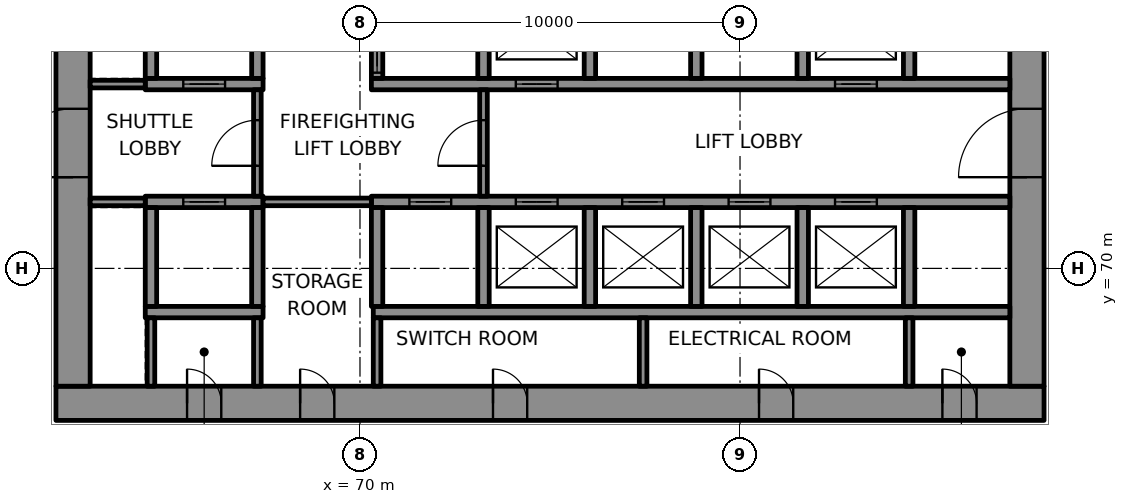
"""IFC4 building model, lengths in metres.
Left out: names, types, materials, properties, quantities, classifications, styles, units other than length and angle.
Written with IfcOpenShell. Run it as: python <this file> out.ifc"""

import sys

from ifc_helpers import new_model, si_unit, direction, frame, frame_2d, origin, place, context, subcontext, project, spatial, rectangle, extrude, element, fill, save


model = new_model("IFC4")
c1 = context("Model", 3, precision=1e-05, world=origin(), true_north=direction((0.0, 1.0)))
c2 = subcontext(c1, "Body", "Model", "MODEL_VIEW")
j1 = project(units=[si_unit("LENGTHUNIT", "METRE"), si_unit("PLANEANGLEUNIT", "RADIAN")], contexts=[c1])
p1 = place(None, origin())
s1 = spatial("IfcSite", under=j1, at=p1, CompositionType="ELEMENT")
p2 = place(p1, origin())
s2 = spatial("IfcBuilding", under=s1, at=p2, CompositionType="ELEMENT")
p3 = place(p2, frame((0.0, 0.0, 140.8)))
s3 = spatial("IfcBuildingStorey", under=s2, at=p3, CompositionType="ELEMENT", Elevation=140.8)
p4 = place(p3, frame((62.0, 66.45, 0.0), z_axis=(0.0, 0.0, 1.0), x_axis=(1.0, 0.0, 0.0)))
e1 = element("IfcWall", 1, at=p4, inside=s3, PredefinedType="SHEAR", context=c2, shape_type="SweptSolid", body=[
    extrude(rectangle(XDim=26.0, YDim=0.9, at=frame_2d((13.0, 0.0))), origin(), (0.0, 0.0, 1.0), 5.55),
])
p5 = place(p4, frame((3.45, 0.0, 0.0)))
e2 = element("IfcOpeningElement", 2, at=p5, cuts=e1, PredefinedType="OPENING", context=c2, shape_type="SweptSolid", body=[
    extrude(rectangle(XDim=0.9, YDim=2.1, at=frame_2d((0.45, 1.05))), frame((0.0, 0.46, 0.0), z_axis=(0.0, -1.0, 0.0), x_axis=(1.0, 0.0, 0.0)), (0.0, 0.0, 1.0), 0.92),
])
p6 = place(p4, frame((6.425, 0.0, 0.0)))
e3 = element("IfcOpeningElement", 3, at=p6, cuts=e1, PredefinedType="OPENING", context=c2, shape_type="SweptSolid", body=[
    extrude(rectangle(XDim=0.9, YDim=2.1, at=frame_2d((0.45, 1.05))), frame((0.0, 0.46, 0.0), z_axis=(0.0, -1.0, 0.0), x_axis=(1.0, 0.0, 0.0)), (0.0, 0.0, 1.0), 0.92),
])
p7 = place(p4, frame((11.5, 0.0, 0.0)))
e4 = element("IfcOpeningElement", 4, at=p7, cuts=e1, PredefinedType="OPENING", context=c2, shape_type="SweptSolid", body=[
    extrude(rectangle(XDim=0.9, YDim=2.1, at=frame_2d((0.45, 1.05))), frame((0.0, 0.46, 0.0), z_axis=(0.0, -1.0, 0.0), x_axis=(1.0, 0.0, 0.0)), (0.0, 0.0, 1.0), 0.92),
])
p8 = place(p4, frame((18.5, 0.0, 0.0)))
e5 = element("IfcOpeningElement", 5, at=p8, cuts=e1, PredefinedType="OPENING", context=c2, shape_type="SweptSolid", body=[
    extrude(rectangle(XDim=0.9, YDim=2.1, at=frame_2d((0.45, 1.05))), frame((0.0, 0.46, 0.0), z_axis=(0.0, -1.0, 0.0), x_axis=(1.0, 0.0, 0.0)), (0.0, 0.0, 1.0), 0.92),
])
p9 = place(p4, frame((23.325, 0.0, 0.0)))
e6 = element("IfcOpeningElement", 6, at=p9, cuts=e1, PredefinedType="OPENING", context=c2, shape_type="SweptSolid", body=[
    extrude(rectangle(XDim=0.9, YDim=2.1, at=frame_2d((0.45, 1.05))), frame((0.0, 0.46, 0.0), z_axis=(0.0, -1.0, 0.0), x_axis=(1.0, 0.0, 0.0)), (0.0, 0.0, 1.0), 0.92),
])
p10 = place(p3, frame((62.45, 66.9, 0.0), z_axis=(0.0, 0.0, 1.0), x_axis=(0.0, 1.0, 0.0)))
e7 = element("IfcWall", 7, at=p10, inside=s3, PredefinedType="SHEAR", context=c2, shape_type="SweptSolid", body=[
    extrude(rectangle(XDim=16.2, YDim=0.9, at=frame_2d((8.1, 0.0))), origin(), (0.0, 0.0, 1.0), 5.55),
])
p11 = place(p10, frame((5.5, 0.0, 0.0)))
e8 = element("IfcOpeningElement", 8, at=p11, cuts=e7, PredefinedType="OPENING", context=c2, shape_type="SweptSolid", body=[
    extrude(rectangle(XDim=1.8, YDim=2.1, at=frame_2d((0.9, 1.05))), frame((0.0, 0.46, 0.0), z_axis=(0.0, -1.0, 0.0), x_axis=(1.0, 0.0, 0.0)), (0.0, 0.0, 1.0), 0.92),
])
p12 = place(p3, frame((87.55, 66.9, 0.0), z_axis=(0.0, 0.0, 1.0), x_axis=(0.0, 1.0, 0.0)))
e9 = element("IfcWall", 9, at=p12, inside=s3, PredefinedType="SHEAR", context=c2, shape_type="SweptSolid", body=[
    extrude(rectangle(XDim=16.2, YDim=0.9, at=frame_2d((8.1, 0.0))), origin(), (0.0, 0.0, 1.0), 5.55),
])
p13 = place(p12, frame((5.5, 0.0, 0.0)))
e10 = element("IfcOpeningElement", 10, at=p13, cuts=e9, PredefinedType="OPENING", context=c2, shape_type="SweptSolid", body=[
    extrude(rectangle(XDim=1.8, YDim=2.1, at=frame_2d((0.9, 1.05))), frame((0.0, 0.46, 0.0), z_axis=(0.0, -1.0, 0.0), x_axis=(1.0, 0.0, 0.0)), (0.0, 0.0, 1.0), 0.92),
])
p14 = place(p12, frame((12.272, 0.0, 0.0)))
e11 = element("IfcOpeningElement", 11, at=p14, cuts=e9, PredefinedType="OPENING", context=c2, shape_type="SweptSolid", body=[
    extrude(rectangle(XDim=0.9, YDim=2.1, at=frame_2d((0.45, 1.05))), frame((0.0, 0.46, 0.0), z_axis=(0.0, -1.0, 0.0), x_axis=(1.0, 0.0, 0.0)), (0.0, 0.0, 1.0), 0.92),
])
p15 = place(p3, frame((64.35, 68.85, 0.0), z_axis=(0.0, 0.0, 1.0), x_axis=(1.0, 0.0, 0.0)))
e12 = element("IfcWall", 12, at=p15, inside=s3, PredefinedType="SHEAR", context=c2, shape_type="SweptSolid", body=[
    extrude(rectangle(XDim=3.1, YDim=0.3, at=frame_2d((1.55, 0.0))), origin(), (0.0, 0.0, 1.0), 5.55),
])
p16 = place(p3, frame((70.35, 68.85, 0.0), z_axis=(0.0, 0.0, 1.0), x_axis=(1.0, 0.0, 0.0)))
e13 = element("IfcWall", 13, at=p16, inside=s3, PredefinedType="SHEAR", context=c2, shape_type="SweptSolid", body=[
    extrude(rectangle(XDim=16.75, YDim=0.3, at=frame_2d((8.375, 0.0))), origin(), (0.0, 0.0, 1.0), 5.55),
])
p17 = place(p3, frame((64.35, 71.75, 0.0), z_axis=(0.0, 0.0, 1.0), x_axis=(1.0, 0.0, 0.0)))
e14 = element("IfcWall", 14, at=p17, inside=s3, PredefinedType="SHEAR", context=c2, shape_type="SweptSolid", body=[
    extrude(rectangle(XDim=3.1, YDim=0.3, at=frame_2d((1.55, 0.0))), origin(), (0.0, 0.0, 1.0), 5.55),
])
p18 = place(p17, frame((1.0, 0.0, 0.0)))
e15 = element("IfcOpeningElement", 15, at=p18, cuts=e14, PredefinedType="OPENING", context=c2, shape_type="SweptSolid", body=[
    extrude(rectangle(XDim=1.1, YDim=2.1, at=frame_2d((0.55, 1.05))), frame((0.0, 0.16, 0.0), z_axis=(0.0, -1.0, 0.0), x_axis=(1.0, 0.0, 0.0)), (0.0, 0.0, 1.0), 0.32),
])
p19 = place(p3, frame((70.3, 71.75, 0.0), z_axis=(0.0, 0.0, 1.0), x_axis=(1.0, 0.0, 0.0)))
e16 = element("IfcWall", 16, at=p19, inside=s3, PredefinedType="SHEAR", context=c2, shape_type="SweptSolid", body=[
    extrude(rectangle(XDim=16.8, YDim=0.3, at=frame_2d((8.4, 0.0))), origin(), (0.0, 0.0, 1.0), 5.55),
])
p20 = place(p19, frame((1.0, 0.0, 0.0)))
e17 = element("IfcOpeningElement", 17, at=p20, cuts=e16, PredefinedType="OPENING", context=c2, shape_type="SweptSolid", body=[
    extrude(rectangle(XDim=1.1, YDim=2.1, at=frame_2d((0.55, 1.05))), frame((0.0, 0.16, 0.0), z_axis=(0.0, -1.0, 0.0), x_axis=(1.0, 0.0, 0.0)), (0.0, 0.0, 1.0), 0.32),
])
p21 = place(p19, frame((3.8, 0.0, 0.0)))
e18 = element("IfcOpeningElement", 18, at=p21, cuts=e16, PredefinedType="OPENING", context=c2, shape_type="SweptSolid", body=[
    extrude(rectangle(XDim=1.1, YDim=2.1, at=frame_2d((0.55, 1.05))), frame((0.0, 0.16, 0.0), z_axis=(0.0, -1.0, 0.0), x_axis=(1.0, 0.0, 0.0)), (0.0, 0.0, 1.0), 0.32),
])
p22 = place(p19, frame((6.6, 0.0, 0.0)))
e19 = element("IfcOpeningElement", 19, at=p22, cuts=e16, PredefinedType="OPENING", context=c2, shape_type="SweptSolid", body=[
    extrude(rectangle(XDim=1.1, YDim=2.1, at=frame_2d((0.55, 1.05))), frame((0.0, 0.16, 0.0), z_axis=(0.0, -1.0, 0.0), x_axis=(1.0, 0.0, 0.0)), (0.0, 0.0, 1.0), 0.32),
])
p23 = place(p19, frame((9.4, 0.0, 0.0)))
e20 = element("IfcOpeningElement", 20, at=p23, cuts=e16, PredefinedType="OPENING", context=c2, shape_type="SweptSolid", body=[
    extrude(rectangle(XDim=1.1, YDim=2.1, at=frame_2d((0.55, 1.05))), frame((0.0, 0.16, 0.0), z_axis=(0.0, -1.0, 0.0), x_axis=(1.0, 0.0, 0.0)), (0.0, 0.0, 1.0), 0.32),
])
p24 = place(p19, frame((12.2, 0.0, 0.0)))
e21 = element("IfcOpeningElement", 21, at=p24, cuts=e16, PredefinedType="OPENING", context=c2, shape_type="SweptSolid", body=[
    extrude(rectangle(XDim=1.1, YDim=2.1, at=frame_2d((0.55, 1.05))), frame((0.0, 0.16, 0.0), z_axis=(0.0, -1.0, 0.0), x_axis=(1.0, 0.0, 0.0)), (0.0, 0.0, 1.0), 0.32),
])
p25 = place(p3, frame((64.35, 74.85, 0.0), z_axis=(0.0, 0.0, 1.0), x_axis=(1.0, 0.0, 0.0)))
e22 = element("IfcWall", 22, at=p25, inside=s3, PredefinedType="SHEAR", context=c2, shape_type="SweptSolid", body=[
    extrude(rectangle(XDim=3.1, YDim=0.3, at=frame_2d((1.55, 0.0))), origin(), (0.0, 0.0, 1.0), 5.55),
])
p26 = place(p25, frame((1.0, 0.0, 0.0)))
e23 = element("IfcOpeningElement", 23, at=p26, cuts=e22, PredefinedType="OPENING", context=c2, shape_type="SweptSolid", body=[
    extrude(rectangle(XDim=1.1, YDim=2.1, at=frame_2d((0.55, 1.05))), frame((0.0, 0.16, 0.0), z_axis=(0.0, -1.0, 0.0), x_axis=(1.0, 0.0, 0.0)), (0.0, 0.0, 1.0), 0.32),
])
p27 = place(p3, frame((70.3, 74.85, 0.0), z_axis=(0.0, 0.0, 1.0), x_axis=(1.0, 0.0, 0.0)))
e24 = element("IfcWall", 24, at=p27, inside=s3, PredefinedType="SHEAR", context=c2, shape_type="SweptSolid", body=[
    extrude(rectangle(XDim=16.8, YDim=0.3, at=frame_2d((8.4, 0.0))), origin(), (0.0, 0.0, 1.0), 5.55),
])
p28 = place(p27, frame((3.8, 0.0, 0.0)))
e25 = element("IfcOpeningElement", 25, at=p28, cuts=e24, PredefinedType="OPENING", context=c2, shape_type="SweptSolid", body=[
    extrude(rectangle(XDim=1.1, YDim=2.1, at=frame_2d((0.55, 1.05))), frame((0.0, 0.16, 0.0), z_axis=(0.0, -1.0, 0.0), x_axis=(1.0, 0.0, 0.0)), (0.0, 0.0, 1.0), 0.32),
])
p29 = place(p27, frame((12.2, 0.0, 0.0)))
e26 = element("IfcOpeningElement", 26, at=p29, cuts=e24, PredefinedType="OPENING", context=c2, shape_type="SweptSolid", body=[
    extrude(rectangle(XDim=1.1, YDim=2.1, at=frame_2d((0.55, 1.05))), frame((0.0, 0.16, 0.0), z_axis=(0.0, -1.0, 0.0), x_axis=(1.0, 0.0, 0.0)), (0.0, 0.0, 1.0), 0.32),
])
for number, where, z_axis, x_axis in (
    (27, (64.5, 69.0, 0.0), (0.0, 0.0, 1.0), (0.0, 1.0, 0.0)),
    (28, (64.5, 75.0, 0.0), (0.0, 0.0, 1.0), (0.0, 1.0, 0.0)),
    (29, (67.3, 69.0, 0.0), (0.0, 0.0, 1.0), (0.0, 1.0, 0.0)),
    (30, (67.3, 75.0, 0.0), (0.0, 0.0, 1.0), (0.0, 1.0, 0.0)),
    (31, (70.45, 69.0, 0.0), (0.0, 0.0, 1.0), (0.0, 1.0, 0.0)),
):
    element("IfcWall", number, at=place(p3, frame(where, z_axis=z_axis, x_axis=x_axis)), inside=s3, PredefinedType="SHEAR", context=c2, shape_type="SweptSolid", body=[
        extrude(rectangle(XDim=2.6, YDim=0.3, at=frame_2d((1.3, 0.0))), origin(), (0.0, 0.0, 1.0), 5.55),
    ])
p30 = place(p3, frame((70.45, 75.0, 0.0), z_axis=(0.0, 0.0, 1.0), x_axis=(0.0, 1.0, 0.0)))
e32 = element("IfcWall", 32, at=p30, inside=s3, PredefinedType="SHEAR", context=c2, shape_type="SweptSolid", body=[
    extrude(rectangle(XDim=2.6, YDim=0.3, at=frame_2d((1.3, 0.0))), origin(), (0.0, 0.0, 1.0), 5.55),
])
p31 = place(p30, frame((0.15, 0.0, 0.0)))
e33 = element("IfcOpeningElement", 33, at=p31, cuts=e32, PredefinedType="OPENING", context=c2, shape_type="SweptSolid", body=[
    extrude(rectangle(XDim=1.1, YDim=2.1, at=frame_2d((0.55, 1.05))), frame((0.0, 0.16, 0.0), z_axis=(0.0, -1.0, 0.0), x_axis=(1.0, 0.0, 0.0)), (0.0, 0.0, 1.0), 0.32),
])
for number, where, z_axis, x_axis in (
    (34, (73.25, 69.0, 0.0), (0.0, 0.0, 1.0), (0.0, 1.0, 0.0)),
    (35, (73.25, 75.0, 0.0), (0.0, 0.0, 1.0), (0.0, 1.0, 0.0)),
    (36, (76.05, 69.0, 0.0), (0.0, 0.0, 1.0), (0.0, 1.0, 0.0)),
    (37, (76.05, 75.0, 0.0), (0.0, 0.0, 1.0), (0.0, 1.0, 0.0)),
    (38, (78.85, 69.0, 0.0), (0.0, 0.0, 1.0), (0.0, 1.0, 0.0)),
    (39, (78.85, 75.0, 0.0), (0.0, 0.0, 1.0), (0.0, 1.0, 0.0)),
    (40, (81.65, 69.0, 0.0), (0.0, 0.0, 1.0), (0.0, 1.0, 0.0)),
    (41, (81.65, 75.0, 0.0), (0.0, 0.0, 1.0), (0.0, 1.0, 0.0)),
    (42, (84.45, 69.0, 0.0), (0.0, 0.0, 1.0), (0.0, 1.0, 0.0)),
    (43, (84.45, 75.0, 0.0), (0.0, 0.0, 1.0), (0.0, 1.0, 0.0)),
):
    element("IfcWall", number, at=place(p3, frame(where, z_axis=z_axis, x_axis=x_axis)), inside=s3, PredefinedType="SHEAR", context=c2, shape_type="SweptSolid", body=[
        extrude(rectangle(XDim=2.6, YDim=0.3, at=frame_2d((1.3, 0.0))), origin(), (0.0, 0.0, 1.0), 5.55),
    ])
p32 = place(p3, frame((62.9, 71.75, 0.0), z_axis=(0.0, 0.0, 1.0), x_axis=(1.0, 0.0, 0.0)))
e44 = element("IfcWall", 44, at=p32, inside=s3, PredefinedType="PARTITIONING", context=c2, shape_type="SweptSolid", body=[
    extrude(rectangle(XDim=1.45, YDim=0.2, at=frame_2d((0.725, 0.0))), origin(), (0.0, 0.0, 1.0), 5.55),
])
p33 = place(p3, frame((67.45, 71.75, 0.0), z_axis=(0.0, 0.0, 1.0), x_axis=(1.0, 0.0, 0.0)))
e45 = element("IfcWall", 45, at=p33, inside=s3, PredefinedType="PARTITIONING", context=c2, shape_type="SweptSolid", body=[
    extrude(rectangle(XDim=2.85, YDim=0.2, at=frame_2d((1.425, 0.0))), origin(), (0.0, 0.0, 1.0), 5.55),
])
p34 = place(p3, frame((62.9, 74.85, 0.0), z_axis=(0.0, 0.0, 1.0), x_axis=(1.0, 0.0, 0.0)))
e46 = element("IfcWall", 46, at=p34, inside=s3, PredefinedType="PARTITIONING", context=c2, shape_type="SweptSolid", body=[
    extrude(rectangle(XDim=1.45, YDim=0.2, at=frame_2d((0.725, 0.0))), origin(), (0.0, 0.0, 1.0), 5.55),
])
for number, where, z_axis, x_axis in (
    (47, (64.5, 66.9, 0.0), (0.0, 0.0, 1.0), (0.0, 1.0, 0.0)),
    (48, (67.3, 66.9, 0.0), (0.0, 0.0, 1.0), (0.0, 1.0, 0.0)),
):
    element("IfcWall", number, at=place(p3, frame(where, z_axis=z_axis, x_axis=x_axis)), inside=s3, PredefinedType="PARTITIONING", context=c2, shape_type="SweptSolid", body=[
        extrude(rectangle(XDim=1.8, YDim=0.2, at=frame_2d((0.9, 0.0))), origin(), (0.0, 0.0, 1.0), 5.55),
    ])
p35 = place(p3, frame((67.3, 71.9, 0.0), z_axis=(0.0, 0.0, 1.0), x_axis=(0.0, 1.0, 0.0)))
e49 = element("IfcWall", 49, at=p35, inside=s3, PredefinedType="PARTITIONING", context=c2, shape_type="SweptSolid", body=[
    extrude(rectangle(XDim=2.8, YDim=0.2, at=frame_2d((1.4, 0.0))), origin(), (0.0, 0.0, 1.0), 5.55),
])
p36 = place(p35, frame((0.8, 0.0, 0.0)))
e50 = element("IfcOpeningElement", 50, at=p36, cuts=e49, PredefinedType="OPENING", context=c2, shape_type="SweptSolid", body=[
    extrude(rectangle(XDim=1.2, YDim=2.1, at=frame_2d((0.6, 1.05))), frame((0.0, 0.11, 0.0), z_axis=(0.0, -1.0, 0.0), x_axis=(1.0, 0.0, 0.0)), (0.0, 0.0, 1.0), 0.22),
])
p37 = place(p3, frame((70.45, 66.9, 0.0), z_axis=(0.0, 0.0, 1.0), x_axis=(0.0, 1.0, 0.0)))
e51 = element("IfcWall", 51, at=p37, inside=s3, PredefinedType="PARTITIONING", context=c2, shape_type="SweptSolid", body=[
    extrude(rectangle(XDim=1.8, YDim=0.2, at=frame_2d((0.9, 0.0))), origin(), (0.0, 0.0, 1.0), 5.55),
])
p38 = place(p3, frame((73.25, 71.9, 0.0), z_axis=(0.0, 0.0, 1.0), x_axis=(0.0, 1.0, 0.0)))
e52 = element("IfcWall", 52, at=p38, inside=s3, PredefinedType="PARTITIONING", context=c2, shape_type="SweptSolid", body=[
    extrude(rectangle(XDim=2.8, YDim=0.2, at=frame_2d((1.4, 0.0))), origin(), (0.0, 0.0, 1.0), 5.55),
])
p39 = place(p38, frame((0.8, 0.0, 0.0)))
e53 = element("IfcOpeningElement", 53, at=p39, cuts=e52, PredefinedType="OPENING", context=c2, shape_type="SweptSolid", body=[
    extrude(rectangle(XDim=1.2, YDim=2.1, at=frame_2d((0.6, 1.05))), frame((0.0, 0.11, 0.0), z_axis=(0.0, -1.0, 0.0), x_axis=(1.0, 0.0, 0.0)), (0.0, 0.0, 1.0), 0.22),
])
for number, where, z_axis, x_axis in (
    (54, (77.45, 66.9, 0.0), (0.0, 0.0, 1.0), (0.0, 1.0, 0.0)),
    (55, (84.45, 66.9, 0.0), (0.0, 0.0, 1.0), (0.0, 1.0, 0.0)),
):
    element("IfcWall", number, at=place(p3, frame(where, z_axis=z_axis, x_axis=x_axis)), inside=s3, PredefinedType="PARTITIONING", context=c2, shape_type="SweptSolid", body=[
        extrude(rectangle(XDim=1.8, YDim=0.2, at=frame_2d((0.9, 0.0))), origin(), (0.0, 0.0, 1.0), 5.55),
    ])
p40 = place(p18, origin())
e56 = element("IfcDoor", 56, at=p40, inside=s3, OperationType="DOUBLE_DOOR_SLIDING", PredefinedType="DOOR", context=c2, shape_type="SweptSolid", body=[
    extrude(rectangle(XDim=1.1, YDim=2.1, at=frame_2d((0.55, 1.05))), frame((0.0, 0.025, 0.0), z_axis=(0.0, -1.0, 0.0), x_axis=(1.0, 0.0, 0.0)), (0.0, 0.0, 1.0), 0.05),
])
fill(e15, e56)
p41 = place(p20, origin())
e57 = element("IfcDoor", 57, at=p41, inside=s3, OperationType="DOUBLE_DOOR_SLIDING", PredefinedType="DOOR", context=c2, shape_type="SweptSolid", body=[
    extrude(rectangle(XDim=1.1, YDim=2.1, at=frame_2d((0.55, 1.05))), frame((0.0, 0.025, 0.0), z_axis=(0.0, -1.0, 0.0), x_axis=(1.0, 0.0, 0.0)), (0.0, 0.0, 1.0), 0.05),
])
fill(e17, e57)
p42 = place(p21, origin())
e58 = element("IfcDoor", 58, at=p42, inside=s3, OperationType="DOUBLE_DOOR_SLIDING", PredefinedType="DOOR", context=c2, shape_type="SweptSolid", body=[
    extrude(rectangle(XDim=1.1, YDim=2.1, at=frame_2d((0.55, 1.05))), frame((0.0, 0.025, 0.0), z_axis=(0.0, -1.0, 0.0), x_axis=(1.0, 0.0, 0.0)), (0.0, 0.0, 1.0), 0.05),
])
fill(e18, e58)
p43 = place(p22, origin())
e59 = element("IfcDoor", 59, at=p43, inside=s3, OperationType="DOUBLE_DOOR_SLIDING", PredefinedType="DOOR", context=c2, shape_type="SweptSolid", body=[
    extrude(rectangle(XDim=1.1, YDim=2.1, at=frame_2d((0.55, 1.05))), frame((0.0, 0.025, 0.0), z_axis=(0.0, -1.0, 0.0), x_axis=(1.0, 0.0, 0.0)), (0.0, 0.0, 1.0), 0.05),
])
fill(e19, e59)
p44 = place(p23, origin())
e60 = element("IfcDoor", 60, at=p44, inside=s3, OperationType="DOUBLE_DOOR_SLIDING", PredefinedType="DOOR", context=c2, shape_type="SweptSolid", body=[
    extrude(rectangle(XDim=1.1, YDim=2.1, at=frame_2d((0.55, 1.05))), frame((0.0, 0.025, 0.0), z_axis=(0.0, -1.0, 0.0), x_axis=(1.0, 0.0, 0.0)), (0.0, 0.0, 1.0), 0.05),
])
fill(e20, e60)
p45 = place(p24, origin())
e61 = element("IfcDoor", 61, at=p45, inside=s3, OperationType="DOUBLE_DOOR_SLIDING", PredefinedType="DOOR", context=c2, shape_type="SweptSolid", body=[
    extrude(rectangle(XDim=1.1, YDim=2.1, at=frame_2d((0.55, 1.05))), frame((0.0, 0.025, 0.0), z_axis=(0.0, -1.0, 0.0), x_axis=(1.0, 0.0, 0.0)), (0.0, 0.0, 1.0), 0.05),
])
fill(e21, e61)
p46 = place(p26, origin())
e62 = element("IfcDoor", 62, at=p46, inside=s3, OperationType="DOUBLE_DOOR_SLIDING", PredefinedType="DOOR", context=c2, shape_type="SweptSolid", body=[
    extrude(rectangle(XDim=1.1, YDim=2.1, at=frame_2d((0.55, 1.05))), frame((0.0, 0.025, 0.0), z_axis=(0.0, -1.0, 0.0), x_axis=(1.0, 0.0, 0.0)), (0.0, 0.0, 1.0), 0.05),
])
fill(e23, e62)
p47 = place(p31, origin())
e63 = element("IfcDoor", 63, at=p47, inside=s3, OperationType="DOUBLE_DOOR_SLIDING", PredefinedType="DOOR", context=c2, shape_type="SweptSolid", body=[
    extrude(rectangle(XDim=1.1, YDim=2.1, at=frame_2d((0.55, 1.05))), frame((0.0, 0.025, 0.0), z_axis=(0.0, -1.0, 0.0), x_axis=(1.0, 0.0, 0.0)), (0.0, 0.0, 1.0), 0.05),
])
fill(e33, e63)
p48 = place(p28, origin())
e64 = element("IfcDoor", 64, at=p48, inside=s3, OperationType="DOUBLE_DOOR_SLIDING", PredefinedType="DOOR", context=c2, shape_type="SweptSolid", body=[
    extrude(rectangle(XDim=1.1, YDim=2.1, at=frame_2d((0.55, 1.05))), frame((0.0, 0.025, 0.0), z_axis=(0.0, -1.0, 0.0), x_axis=(1.0, 0.0, 0.0)), (0.0, 0.0, 1.0), 0.05),
])
fill(e25, e64)
p49 = place(p29, origin())
e65 = element("IfcDoor", 65, at=p49, inside=s3, OperationType="DOUBLE_DOOR_SLIDING", PredefinedType="DOOR", context=c2, shape_type="SweptSolid", body=[
    extrude(rectangle(XDim=1.1, YDim=2.1, at=frame_2d((0.55, 1.05))), frame((0.0, 0.025, 0.0), z_axis=(0.0, -1.0, 0.0), x_axis=(1.0, 0.0, 0.0)), (0.0, 0.0, 1.0), 0.05),
])
fill(e26, e65)
p50 = place(p39, origin())
e66 = element("IfcDoor", 66, at=p50, inside=s3, OperationType="SINGLE_SWING_LEFT", PredefinedType="DOOR", context=c2, shape_type="SweptSolid", body=[
    extrude(rectangle(XDim=1.2, YDim=2.1, at=frame_2d((0.6, 1.05))), frame((0.0, 0.025, 0.0), z_axis=(0.0, -1.0, 0.0), x_axis=(1.0, 0.0, 0.0)), (0.0, 0.0, 1.0), 0.05),
])
fill(e53, e66)
p51 = place(p36, origin())
e67 = element("IfcDoor", 67, at=p51, inside=s3, OperationType="SINGLE_SWING_RIGHT", PredefinedType="DOOR", context=c2, shape_type="SweptSolid", body=[
    extrude(rectangle(XDim=1.2, YDim=2.1, at=frame_2d((0.6, 1.05))), frame((0.0, 0.025, 0.0), z_axis=(0.0, -1.0, 0.0), x_axis=(1.0, 0.0, 0.0)), (0.0, 0.0, 1.0), 0.05),
])
fill(e50, e67)
p52 = place(p11, origin())
e68 = element("IfcDoor", 68, at=p52, inside=s3, OperationType="SINGLE_SWING_LEFT", PredefinedType="DOOR", context=c2, shape_type="SweptSolid", body=[
    extrude(rectangle(XDim=1.8, YDim=2.1, at=frame_2d((0.9, 1.05))), frame((0.0, 0.17, 0.0), z_axis=(0.0, -1.0, 0.0), x_axis=(1.0, 0.0, 0.0)), (0.0, 0.0, 1.0), 0.34),
])
fill(e8, e68)
p53 = place(p13, origin())
e69 = element("IfcDoor", 69, at=p53, inside=s3, OperationType="SINGLE_SWING_RIGHT", PredefinedType="DOOR", context=c2, shape_type="SweptSolid", body=[
    extrude(rectangle(XDim=1.8, YDim=2.1, at=frame_2d((0.9, 1.05))), frame((0.0, 0.17, 0.0), z_axis=(0.0, -1.0, 0.0), x_axis=(1.0, 0.0, 0.0)), (0.0, 0.0, 1.0), 0.34),
])
fill(e10, e69)
p54 = place(p5, origin())
e70 = element("IfcDoor", 70, at=p54, inside=s3, OperationType="SINGLE_SWING_LEFT", PredefinedType="DOOR", context=c2, shape_type="SweptSolid", body=[
    extrude(rectangle(XDim=0.9, YDim=2.1, at=frame_2d((0.45, 1.05))), frame((0.0, 0.17, 0.0), z_axis=(0.0, -1.0, 0.0), x_axis=(1.0, 0.0, 0.0)), (0.0, 0.0, 1.0), 0.34),
])
fill(e2, e70)
p55 = place(p6, origin())
e71 = element("IfcDoor", 71, at=p55, inside=s3, OperationType="SINGLE_SWING_RIGHT", PredefinedType="DOOR", context=c2, shape_type="SweptSolid", body=[
    extrude(rectangle(XDim=0.9, YDim=2.1, at=frame_2d((0.45, 1.05))), frame((0.0, 0.17, 0.0), z_axis=(0.0, -1.0, 0.0), x_axis=(1.0, 0.0, 0.0)), (0.0, 0.0, 1.0), 0.34),
])
fill(e3, e71)
p56 = place(p7, origin())
e72 = element("IfcDoor", 72, at=p56, inside=s3, OperationType="SINGLE_SWING_LEFT", PredefinedType="DOOR", context=c2, shape_type="SweptSolid", body=[
    extrude(rectangle(XDim=0.9, YDim=2.1, at=frame_2d((0.45, 1.05))), frame((0.0, 0.17, 0.0), z_axis=(0.0, -1.0, 0.0), x_axis=(1.0, 0.0, 0.0)), (0.0, 0.0, 1.0), 0.34),
])
fill(e4, e72)
p57 = place(p8, origin())
e73 = element("IfcDoor", 73, at=p57, inside=s3, OperationType="SINGLE_SWING_RIGHT", PredefinedType="DOOR", context=c2, shape_type="SweptSolid", body=[
    extrude(rectangle(XDim=0.9, YDim=2.1, at=frame_2d((0.45, 1.05))), frame((0.0, 0.17, 0.0), z_axis=(0.0, -1.0, 0.0), x_axis=(1.0, 0.0, 0.0)), (0.0, 0.0, 1.0), 0.34),
])
fill(e5, e73)
p58 = place(p9, origin())
e74 = element("IfcDoor", 74, at=p58, inside=s3, OperationType="SINGLE_SWING_LEFT", PredefinedType="DOOR", context=c2, shape_type="SweptSolid", body=[
    extrude(rectangle(XDim=0.9, YDim=2.1, at=frame_2d((0.45, 1.05))), frame((0.0, 0.17, 0.0), z_axis=(0.0, -1.0, 0.0), x_axis=(1.0, 0.0, 0.0)), (0.0, 0.0, 1.0), 0.34),
])
fill(e6, e74)
save(model, sys.argv[1])
